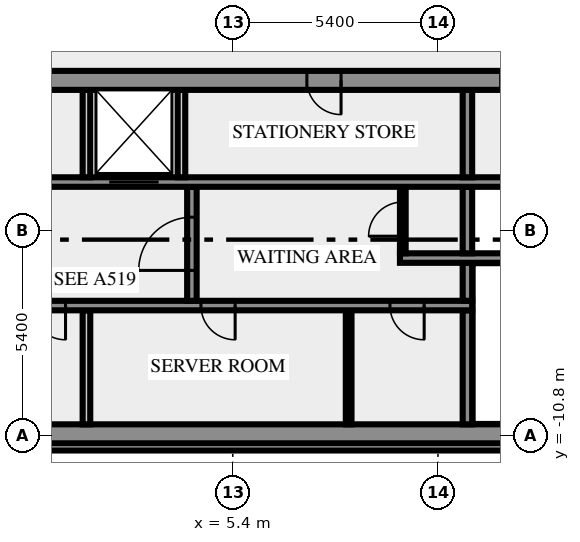
"""IFC4 building model, lengths in metres.
Left out: names, types, materials, properties, quantities, classifications, styles, units other than length and angle.
Written with IfcOpenShell. Run it as: python <this file> out.ifc"""

import sys

from ifc_helpers import new_model, si_unit, direction, frame, frame_2d, origin, place, context, subcontext, project, spatial, rectangle, extrude, element, fill, save


model = new_model("IFC4")
c1 = context("Model", 3, precision=1e-05, world=origin(), true_north=direction((0.0, 1.0)))
c2 = subcontext(c1, "Body", "Model", "MODEL_VIEW")
j1 = project(units=[si_unit("LENGTHUNIT", "METRE"), si_unit("PLANEANGLEUNIT", "RADIAN")], contexts=[c1])
p1 = place(None, origin())
s1 = spatial("IfcSite", under=j1, at=p1, CompositionType="ELEMENT")
p2 = place(p1, origin())
s2 = spatial("IfcBuilding", under=s1, at=p2, CompositionType="ELEMENT")
p3 = place(p2, frame((0.0, 0.0, 315.0)))
s3 = spatial("IfcBuildingStorey", under=s2, at=p3, CompositionType="ELEMENT", Elevation=315.0)
p4 = place(p3, frame((-17.444, -11.088, 0.0), z_axis=(0.0, 0.0, 1.0), x_axis=(1.0, 0.0, 0.0)))
e1 = element("IfcWall", 1, at=p4, inside=s3, PredefinedType="SOLIDWALL", context=c2, shape_type="SweptSolid", body=[
    extrude(rectangle(XDim=34.888, YDim=0.2, at=frame_2d((17.444, 0.0))), origin(), (0.0, 0.0, 1.0), 3.65),
])
p5 = place(p3, frame((-20.0, -10.75, 0.0), z_axis=(0.0, 0.0, 1.0), x_axis=(1.0, 0.0, 0.0)))
e2 = element("IfcWall", 2, at=p5, inside=s3, PredefinedType="SHEAR", context=c2, shape_type="SweptSolid", body=[
    extrude(rectangle(XDim=40.0, YDim=0.5, at=frame_2d((20.0, 0.0))), origin(), (0.0, 0.0, 1.0), 3.65),
])
p6 = place(p5, frame((0.8, 0.0, 1.0)))
e3 = element("IfcOpeningElement", 3, at=p6, cuts=e2, PredefinedType="OPENING", context=c2, shape_type="SweptSolid", body=[
    extrude(rectangle(XDim=1.2, YDim=1.2, at=frame_2d((0.6, 0.6))), frame((0.0, 0.26, 0.0), z_axis=(0.0, -1.0, 0.0), x_axis=(1.0, 0.0, 0.0)), (0.0, 0.0, 1.0), 0.52),
])
p7 = place(p5, frame((38.0, 0.0, 1.0)))
e4 = element("IfcOpeningElement", 4, at=p7, cuts=e2, PredefinedType="OPENING", context=c2, shape_type="SweptSolid", body=[
    extrude(rectangle(XDim=1.2, YDim=1.2, at=frame_2d((0.6, 0.6))), frame((0.0, 0.26, 0.0), z_axis=(0.0, -1.0, 0.0), x_axis=(1.0, 0.0, 0.0)), (0.0, 0.0, 1.0), 0.52),
])
p8 = place(p3, frame((1.55, -10.5, 0.0), z_axis=(0.0, 0.0, 1.0), x_axis=(0.0, 1.0, 0.0)))
e5 = element("IfcWall", 5, at=p8, inside=s3, PredefinedType="SOLIDWALL", context=c2, shape_type="SweptSolid", body=[
    extrude(rectangle(XDim=3.0, YDim=0.2, at=frame_2d((1.5, 0.0))), origin(), (0.0, 0.0, 1.0), 3.65),
])
p9 = place(p3, frame((8.45, -10.5, 0.0), z_axis=(0.0, 0.0, 1.0), x_axis=(0.0, 1.0, 0.0)))
e6 = element("IfcWall", 6, at=p9, inside=s3, PredefinedType="PARTITIONING", context=c2, shape_type="SweptSolid", body=[
    extrude(rectangle(XDim=3.0, YDim=0.15, at=frame_2d((1.5, 0.0))), origin(), (0.0, 0.0, 1.0), 3.65),
])
p10 = place(p3, frame((11.575, -10.5, 0.0), z_axis=(0.0, 0.0, 1.0), x_axis=(0.0, 1.0, 0.0)))
e7 = element("IfcWall", 7, at=p10, inside=s3, PredefinedType="SHEAR", context=c2, shape_type="SweptSolid", body=[
    extrude(rectangle(XDim=3.0, YDim=0.25, at=frame_2d((1.5, 0.0))), origin(), (0.0, 0.0, 1.0), 3.65),
])
p11 = place(p3, frame((11.7, -7.375, 0.0), z_axis=(0.0, 0.0, 1.0), x_axis=(-1.0, 0.0, 0.0)))
e8 = element("IfcWall", 8, at=p11, inside=s3, PredefinedType="SHEAR", context=c2, shape_type="SweptSolid", body=[
    extrude(rectangle(XDim=23.4, YDim=0.25, at=frame_2d((11.7, 0.0))), origin(), (0.0, 0.0, 1.0), 3.65),
])
p12 = place(p11, frame((22.225, 0.0, 0.0)))
e9 = element("IfcOpeningElement", 9, at=p12, cuts=e8, PredefinedType="OPENING", context=c2, shape_type="SweptSolid", body=[
    extrude(rectangle(XDim=0.8, YDim=2.1, at=frame_2d((0.4, 1.05))), frame((0.0, 0.135, 0.0), z_axis=(0.0, -1.0, 0.0), x_axis=(1.0, 0.0, 0.0)), (0.0, 0.0, 1.0), 0.27),
])
p13 = place(p11, frame((20.2, 0.0, 0.0)))
e10 = element("IfcOpeningElement", 10, at=p13, cuts=e8, PredefinedType="OPENING", context=c2, shape_type="SweptSolid", body=[
    extrude(rectangle(XDim=1.1, YDim=2.1, at=frame_2d((0.55, 1.05))), frame((0.0, 0.135, 0.0), z_axis=(0.0, -1.0, 0.0), x_axis=(1.0, 0.0, 0.0)), (0.0, 0.0, 1.0), 0.27),
])
p14 = place(p11, frame((17.7, 0.0, 0.0)))
e11 = element("IfcOpeningElement", 11, at=p14, cuts=e8, PredefinedType="OPENING", context=c2, shape_type="SweptSolid", body=[
    extrude(rectangle(XDim=1.1, YDim=2.1, at=frame_2d((0.55, 1.05))), frame((0.0, 0.135, 0.0), z_axis=(0.0, -1.0, 0.0), x_axis=(1.0, 0.0, 0.0)), (0.0, 0.0, 1.0), 0.27),
])
p15 = place(p11, frame((15.975, 0.0, 0.0)))
e12 = element("IfcOpeningElement", 12, at=p15, cuts=e8, PredefinedType="OPENING", context=c2, shape_type="SweptSolid", body=[
    extrude(rectangle(XDim=0.8, YDim=2.1, at=frame_2d((0.4, 1.05))), frame((0.0, 0.135, 0.0), z_axis=(0.0, -1.0, 0.0), x_axis=(1.0, 0.0, 0.0)), (0.0, 0.0, 1.0), 0.27),
])
p16 = place(p11, frame((14.65, 0.0, 0.0)))
e13 = element("IfcOpeningElement", 13, at=p16, cuts=e8, PredefinedType="OPENING", context=c2, shape_type="SweptSolid", body=[
    extrude(rectangle(XDim=0.8, YDim=2.1, at=frame_2d((0.4, 1.05))), frame((0.0, 0.135, 0.0), z_axis=(0.0, -1.0, 0.0), x_axis=(1.0, 0.0, 0.0)), (0.0, 0.0, 1.0), 0.27),
])
p17 = place(p11, frame((12.8, 0.0, 0.0)))
e14 = element("IfcOpeningElement", 14, at=p17, cuts=e8, PredefinedType="OPENING", context=c2, shape_type="SweptSolid", body=[
    extrude(rectangle(XDim=0.9, YDim=2.1, at=frame_2d((0.45, 1.05))), frame((0.0, 0.135, 0.0), z_axis=(0.0, -1.0, 0.0), x_axis=(1.0, 0.0, 0.0)), (0.0, 0.0, 1.0), 0.27),
])
p18 = place(p11, frame((10.7, 0.0, 0.0)))
e15 = element("IfcOpeningElement", 15, at=p18, cuts=e8, PredefinedType="OPENING", context=c2, shape_type="SweptSolid", body=[
    extrude(rectangle(XDim=0.9, YDim=2.1, at=frame_2d((0.45, 1.05))), frame((0.0, 0.135, 0.0), z_axis=(0.0, -1.0, 0.0), x_axis=(1.0, 0.0, 0.0)), (0.0, 0.0, 1.0), 0.27),
])
p19 = place(p11, frame((6.237, 0.0, 0.0)))
e16 = element("IfcOpeningElement", 16, at=p19, cuts=e8, PredefinedType="OPENING", context=c2, shape_type="SweptSolid", body=[
    extrude(rectangle(XDim=0.9, YDim=2.1, at=frame_2d((0.45, 1.05))), frame((0.0, 0.135, 0.0), z_axis=(0.0, -1.0, 0.0), x_axis=(1.0, 0.0, 0.0)), (0.0, 0.0, 1.0), 0.27),
])
p20 = place(p11, frame((1.263, 0.0, 0.0)))
e17 = element("IfcOpeningElement", 17, at=p20, cuts=e8, PredefinedType="OPENING", context=c2, shape_type="SweptSolid", body=[
    extrude(rectangle(XDim=0.9, YDim=2.1, at=frame_2d((0.45, 1.05))), frame((0.0, 0.135, 0.0), z_axis=(0.0, -1.0, 0.0), x_axis=(1.0, 0.0, 0.0)), (0.0, 0.0, 1.0), 0.27),
])
p21 = place(p3, frame((4.325, -7.25, 0.0), z_axis=(0.0, 0.0, 1.0), x_axis=(0.0, 1.0, 0.0)))
e18 = element("IfcWall", 18, at=p21, inside=s3, PredefinedType="SHEAR", context=c2, shape_type="SweptSolid", body=[
    extrude(rectangle(XDim=3.0, YDim=0.25, at=frame_2d((1.5, 0.0))), origin(), (0.0, 0.0, 1.0), 3.65),
])
p22 = place(p21, frame((0.8, 0.0, 0.0)))
e19 = element("IfcOpeningElement", 19, at=p22, cuts=e18, PredefinedType="OPENING", context=c2, shape_type="SweptSolid", body=[
    extrude(rectangle(XDim=1.4, YDim=2.1, at=frame_2d((0.7, 1.05))), frame((0.0, 0.135, 0.0), z_axis=(0.0, -1.0, 0.0), x_axis=(1.0, 0.0, 0.0)), (0.0, 0.0, 1.0), 0.27),
])
p23 = place(p3, frame((11.575, -7.25, 0.0), z_axis=(0.0, 0.0, 1.0), x_axis=(0.0, 1.0, 0.0)))
e20 = element("IfcWall", 20, at=p23, inside=s3, PredefinedType="SHEAR", context=c2, shape_type="SweptSolid", body=[
    extrude(rectangle(XDim=1.0, YDim=0.25, at=frame_2d((0.5, 0.0))), origin(), (0.0, 0.0, 1.0), 3.65),
])
p24 = place(p3, frame((20.0, -6.125, 0.0), z_axis=(0.0, 0.0, 1.0), x_axis=(-1.0, 0.0, 0.0)))
e21 = element("IfcWall", 21, at=p24, inside=s3, PredefinedType="SHEAR", context=c2, shape_type="SweptSolid", body=[
    extrude(rectangle(XDim=10.2, YDim=0.25, at=frame_2d((5.1, 0.0))), origin(), (0.0, 0.0, 1.0), 3.65),
])
p25 = place(p24, frame((0.55, 0.0, 0.0)))
e22 = element("IfcOpeningElement", 22, at=p25, cuts=e21, PredefinedType="OPENING", context=c2, shape_type="SweptSolid", body=[
    extrude(rectangle(XDim=1.8, YDim=2.1, at=frame_2d((0.9, 1.05))), frame((0.0, 0.135, 0.0), z_axis=(0.0, -1.0, 0.0), x_axis=(1.0, 0.0, 0.0)), (0.0, 0.0, 1.0), 0.27),
])
p26 = place(p3, frame((9.875, -6.0, 0.0), z_axis=(0.0, 0.0, 1.0), x_axis=(0.0, 1.0, 0.0)))
e23 = element("IfcWall", 23, at=p26, inside=s3, PredefinedType="PARTITIONING", context=c2, shape_type="SweptSolid", body=[
    extrude(rectangle(XDim=1.75, YDim=0.15, at=frame_2d((0.875, 0.0))), origin(), (0.0, 0.0, 1.0), 3.65),
])
p27 = place(p26, frame((0.45, 0.0, 0.0)))
e24 = element("IfcOpeningElement", 24, at=p27, cuts=e23, PredefinedType="OPENING", context=c2, shape_type="SweptSolid", body=[
    extrude(rectangle(XDim=0.9, YDim=2.1, at=frame_2d((0.45, 1.05))), frame((0.0, 0.085, 0.0), z_axis=(0.0, -1.0, 0.0), x_axis=(1.0, 0.0, 0.0)), (0.0, 0.0, 1.0), 0.17),
])
p28 = place(p3, frame((11.575, -6.0, 0.0), z_axis=(0.0, 0.0, 1.0), x_axis=(0.0, 1.0, 0.0)))
e25 = element("IfcWall", 25, at=p28, inside=s3, PredefinedType="SHEAR", context=c2, shape_type="SweptSolid", body=[
    extrude(rectangle(XDim=1.75, YDim=0.25, at=frame_2d((0.875, 0.0))), origin(), (0.0, 0.0, 1.0), 3.65),
])
p29 = place(p3, frame((-0.6, -4.125, 0.0), z_axis=(0.0, 0.0, 1.0), x_axis=(1.0, 0.0, 0.0)))
e26 = element("IfcWall", 26, at=p29, inside=s3, PredefinedType="SHEAR", context=c2, shape_type="SweptSolid", body=[
    extrude(rectangle(XDim=14.95, YDim=0.25, at=frame_2d((7.475, 0.0))), origin(), (0.0, 0.0, 1.0), 3.65),
])
p30 = place(p29, frame((2.75, 0.0, 0.0)))
e27 = element("IfcOpeningElement", 27, at=p30, cuts=e26, PredefinedType="OPENING", context=c2, shape_type="SweptSolid", body=[
    extrude(rectangle(XDim=1.3, YDim=2.1, at=frame_2d((0.65, 1.05))), frame((0.0, 0.135, 0.0), z_axis=(0.0, -1.0, 0.0), x_axis=(1.0, 0.0, 0.0)), (0.0, 0.0, 1.0), 0.27),
])
for number, where, z_axis, x_axis in (
    (28, (1.55, -4.0, 0.0), (0.0, 0.0, 1.0), (0.0, 1.0, 0.0)),
    (29, (4.05, -4.0, 0.0), (0.0, 0.0, 1.0), (0.0, 1.0, 0.0)),
):
    element("IfcWall", number, at=place(p3, frame(where, z_axis=z_axis, x_axis=x_axis)), inside=s3, PredefinedType="SOLIDWALL", context=c2, shape_type="SweptSolid", body=[
        extrude(rectangle(XDim=2.3, YDim=0.2, at=frame_2d((1.15, 0.0))), origin(), (0.0, 0.0, 1.0), 3.65),
    ])
p31 = place(p3, frame((11.575, -4.0, 0.0), z_axis=(0.0, 0.0, 1.0), x_axis=(0.0, 1.0, 0.0)))
e30 = element("IfcWall", 30, at=p31, inside=s3, PredefinedType="SHEAR", context=c2, shape_type="SweptSolid", body=[
    extrude(rectangle(XDim=2.3, YDim=0.25, at=frame_2d((1.15, 0.0))), origin(), (0.0, 0.0, 1.0), 3.65),
])
p32 = place(p3, frame((20.49, -1.45, 0.0), z_axis=(0.0, 0.0, 1.0), x_axis=(-1.0, 0.0, 0.0)))
e31 = element("IfcWall", 31, at=p32, inside=s3, PredefinedType="SHEAR", context=c2, shape_type="SweptSolid", body=[
    extrude(rectangle(XDim=40.98, YDim=0.5, at=frame_2d((20.49, 0.0))), origin(), (0.0, 0.0, 1.0), 3.65),
])
p33 = place(p32, frame((38.14, 0.0, 0.0)))
e32 = element("IfcOpeningElement", 32, at=p33, cuts=e31, PredefinedType="OPENING", context=c2, shape_type="SweptSolid", body=[
    extrude(rectangle(XDim=1.8, YDim=2.1, at=frame_2d((0.9, 1.05))), frame((0.0, 0.26, 0.0), z_axis=(0.0, -1.0, 0.0), x_axis=(1.0, 0.0, 0.0)), (0.0, 0.0, 1.0), 0.52),
])
p34 = place(p32, frame((35.89, 0.0, 0.0)))
e33 = element("IfcOpeningElement", 33, at=p34, cuts=e31, PredefinedType="OPENING", context=c2, shape_type="SweptSolid", body=[
    extrude(rectangle(XDim=0.9, YDim=2.1, at=frame_2d((0.45, 1.05))), frame((0.0, 0.26, 0.0), z_axis=(0.0, -1.0, 0.0), x_axis=(1.0, 0.0, 0.0)), (0.0, 0.0, 1.0), 0.52),
])
p35 = place(p32, frame((32.94, 0.0, 0.0)))
e34 = element("IfcOpeningElement", 34, at=p35, cuts=e31, PredefinedType="OPENING", context=c2, shape_type="SweptSolid", body=[
    extrude(rectangle(XDim=0.9, YDim=2.1, at=frame_2d((0.45, 1.05))), frame((0.0, 0.26, 0.0), z_axis=(0.0, -1.0, 0.0), x_axis=(1.0, 0.0, 0.0)), (0.0, 0.0, 1.0), 0.52),
])
p36 = place(p32, frame((31.015, 0.0, 0.0)))
e35 = element("IfcOpeningElement", 35, at=p36, cuts=e31, PredefinedType="OPENING", context=c2, shape_type="SweptSolid", body=[
    extrude(rectangle(XDim=0.8, YDim=2.1, at=frame_2d((0.4, 1.05))), frame((0.0, 0.26, 0.0), z_axis=(0.0, -1.0, 0.0), x_axis=(1.0, 0.0, 0.0)), (0.0, 0.0, 1.0), 0.52),
])
p37 = place(p32, frame((24.765, 0.0, 0.0)))
e36 = element("IfcOpeningElement", 36, at=p37, cuts=e31, PredefinedType="OPENING", context=c2, shape_type="SweptSolid", body=[
    extrude(rectangle(XDim=0.8, YDim=2.1, at=frame_2d((0.4, 1.05))), frame((0.0, 0.26, 0.0), z_axis=(0.0, -1.0, 0.0), x_axis=(1.0, 0.0, 0.0)), (0.0, 0.0, 1.0), 0.52),
])
p38 = place(p32, frame((21.765, 0.0, 0.0)))
e37 = element("IfcOpeningElement", 37, at=p38, cuts=e31, PredefinedType="OPENING", context=c2, shape_type="SweptSolid", body=[
    extrude(rectangle(XDim=2.0, YDim=2.1, at=frame_2d((1.0, 1.05))), frame((0.0, 0.26, 0.0), z_axis=(0.0, -1.0, 0.0), x_axis=(1.0, 0.0, 0.0)), (0.0, 0.0, 1.0), 0.52),
])
p39 = place(p32, frame((12.24, 0.0, 0.0)))
e38 = element("IfcOpeningElement", 38, at=p39, cuts=e31, PredefinedType="OPENING", context=c2, shape_type="SweptSolid", body=[
    extrude(rectangle(XDim=0.9, YDim=2.1, at=frame_2d((0.45, 1.05))), frame((0.0, 0.26, 0.0), z_axis=(0.0, -1.0, 0.0), x_axis=(1.0, 0.0, 0.0)), (0.0, 0.0, 1.0), 0.52),
])
p40 = place(p32, frame((7.14, 0.0, 0.0)))
e39 = element("IfcOpeningElement", 39, at=p40, cuts=e31, PredefinedType="OPENING", context=c2, shape_type="SweptSolid", body=[
    extrude(rectangle(XDim=0.9, YDim=2.1, at=frame_2d((0.45, 1.05))), frame((0.0, 0.26, 0.0), z_axis=(0.0, -1.0, 0.0), x_axis=(1.0, 0.0, 0.0)), (0.0, 0.0, 1.0), 0.52),
])
p41 = place(p32, frame((5.028, 0.0, 0.0)))
e40 = element("IfcOpeningElement", 40, at=p41, cuts=e31, PredefinedType="OPENING", context=c2, shape_type="SweptSolid", body=[
    extrude(rectangle(XDim=0.8, YDim=2.1, at=frame_2d((0.4, 1.05))), frame((0.0, 0.26, 0.0), z_axis=(0.0, -1.0, 0.0), x_axis=(1.0, 0.0, 0.0)), (0.0, 0.0, 1.0), 0.52),
])
p42 = place(p32, frame((3.452, 0.0, 0.0)))
e41 = element("IfcOpeningElement", 41, at=p42, cuts=e31, PredefinedType="OPENING", context=c2, shape_type="SweptSolid", body=[
    extrude(rectangle(XDim=0.8, YDim=2.1, at=frame_2d((0.4, 1.05))), frame((0.0, 0.26, 0.0), z_axis=(0.0, -1.0, 0.0), x_axis=(1.0, 0.0, 0.0)), (0.0, 0.0, 1.0), 0.52),
])
p43 = place(p32, frame((1.04, 0.0, 0.0)))
e42 = element("IfcOpeningElement", 42, at=p43, cuts=e31, PredefinedType="OPENING", context=c2, shape_type="SweptSolid", body=[
    extrude(rectangle(XDim=1.8, YDim=2.1, at=frame_2d((0.9, 1.05))), frame((0.0, 0.26, 0.0), z_axis=(0.0, -1.0, 0.0), x_axis=(1.0, 0.0, 0.0)), (0.0, 0.0, 1.0), 0.52),
])
p44 = place(p18, origin())
e43 = element("IfcDoor", 43, at=p44, inside=s3, OperationType="SINGLE_SWING_LEFT", PredefinedType="DOOR", context=c2, shape_type="SweptSolid", body=[
    extrude(rectangle(XDim=0.9, YDim=2.1, at=frame_2d((0.45, 1.05))), frame((0.0, 0.025, 0.0), z_axis=(0.0, -1.0, 0.0), x_axis=(1.0, 0.0, 0.0)), (0.0, 0.0, 1.0), 0.05),
])
fill(e15, e43)
p45 = place(p19, origin())
e44 = element("IfcDoor", 44, at=p45, inside=s3, OperationType="SINGLE_SWING_LEFT", PredefinedType="DOOR", context=c2, shape_type="SweptSolid", body=[
    extrude(rectangle(XDim=0.9, YDim=2.1, at=frame_2d((0.45, 1.05))), frame((0.0, 0.025, 0.0), z_axis=(0.0, -1.0, 0.0), x_axis=(1.0, 0.0, 0.0)), (0.0, 0.0, 1.0), 0.05),
])
fill(e16, e44)
p46 = place(p20, origin())
e45 = element("IfcDoor", 45, at=p46, inside=s3, OperationType="SINGLE_SWING_LEFT", PredefinedType="DOOR", context=c2, shape_type="SweptSolid", body=[
    extrude(rectangle(XDim=0.9, YDim=2.1, at=frame_2d((0.45, 1.05))), frame((0.0, 0.025, 0.0), z_axis=(0.0, -1.0, 0.0), x_axis=(1.0, 0.0, 0.0)), (0.0, 0.0, 1.0), 0.05),
])
fill(e17, e45)
p47 = place(p22, origin())
e46 = element("IfcDoor", 46, at=p47, inside=s3, OperationType="DOUBLE_DOOR_SINGLE_SWING", PredefinedType="DOOR", context=c2, shape_type="SweptSolid", body=[
    extrude(rectangle(XDim=1.4, YDim=2.1, at=frame_2d((0.7, 1.05))), frame((0.0, 0.025, 0.0), z_axis=(0.0, -1.0, 0.0), x_axis=(1.0, 0.0, 0.0)), (0.0, 0.0, 1.0), 0.05),
])
fill(e19, e46)
p48 = place(p27, origin())
e47 = element("IfcDoor", 47, at=p48, inside=s3, OperationType="SINGLE_SWING_RIGHT", PredefinedType="DOOR", context=c2, shape_type="SweptSolid", body=[
    extrude(rectangle(XDim=0.9, YDim=2.1, at=frame_2d((0.45, 1.05))), frame((0.0, 0.025, 0.0), z_axis=(0.0, -1.0, 0.0), x_axis=(1.0, 0.0, 0.0)), (0.0, 0.0, 1.0), 0.05),
])
fill(e24, e47)
p49 = place(p30, origin())
e48 = element("IfcDoor", 48, at=p49, inside=s3, OperationType="DOUBLE_DOOR_SLIDING", PredefinedType="DOOR", context=c2, shape_type="SweptSolid", body=[
    extrude(rectangle(XDim=1.3, YDim=2.1, at=frame_2d((0.65, 1.05))), frame((0.0, 0.025, 0.0), z_axis=(0.0, -1.0, 0.0), x_axis=(1.0, 0.0, 0.0)), (0.0, 0.0, 1.0), 0.05),
])
fill(e27, e48)
p50 = place(p39, origin())
e49 = element("IfcDoor", 49, at=p50, inside=s3, OperationType="SINGLE_SWING_LEFT", PredefinedType="DOOR", context=c2, shape_type="SweptSolid", body=[
    extrude(rectangle(XDim=0.9, YDim=2.1, at=frame_2d((0.45, 1.05))), frame((0.0, 0.025, 0.0), z_axis=(0.0, -1.0, 0.0), x_axis=(1.0, 0.0, 0.0)), (0.0, 0.0, 1.0), 0.05),
])
fill(e38, e49)
save(model, sys.argv[1])
